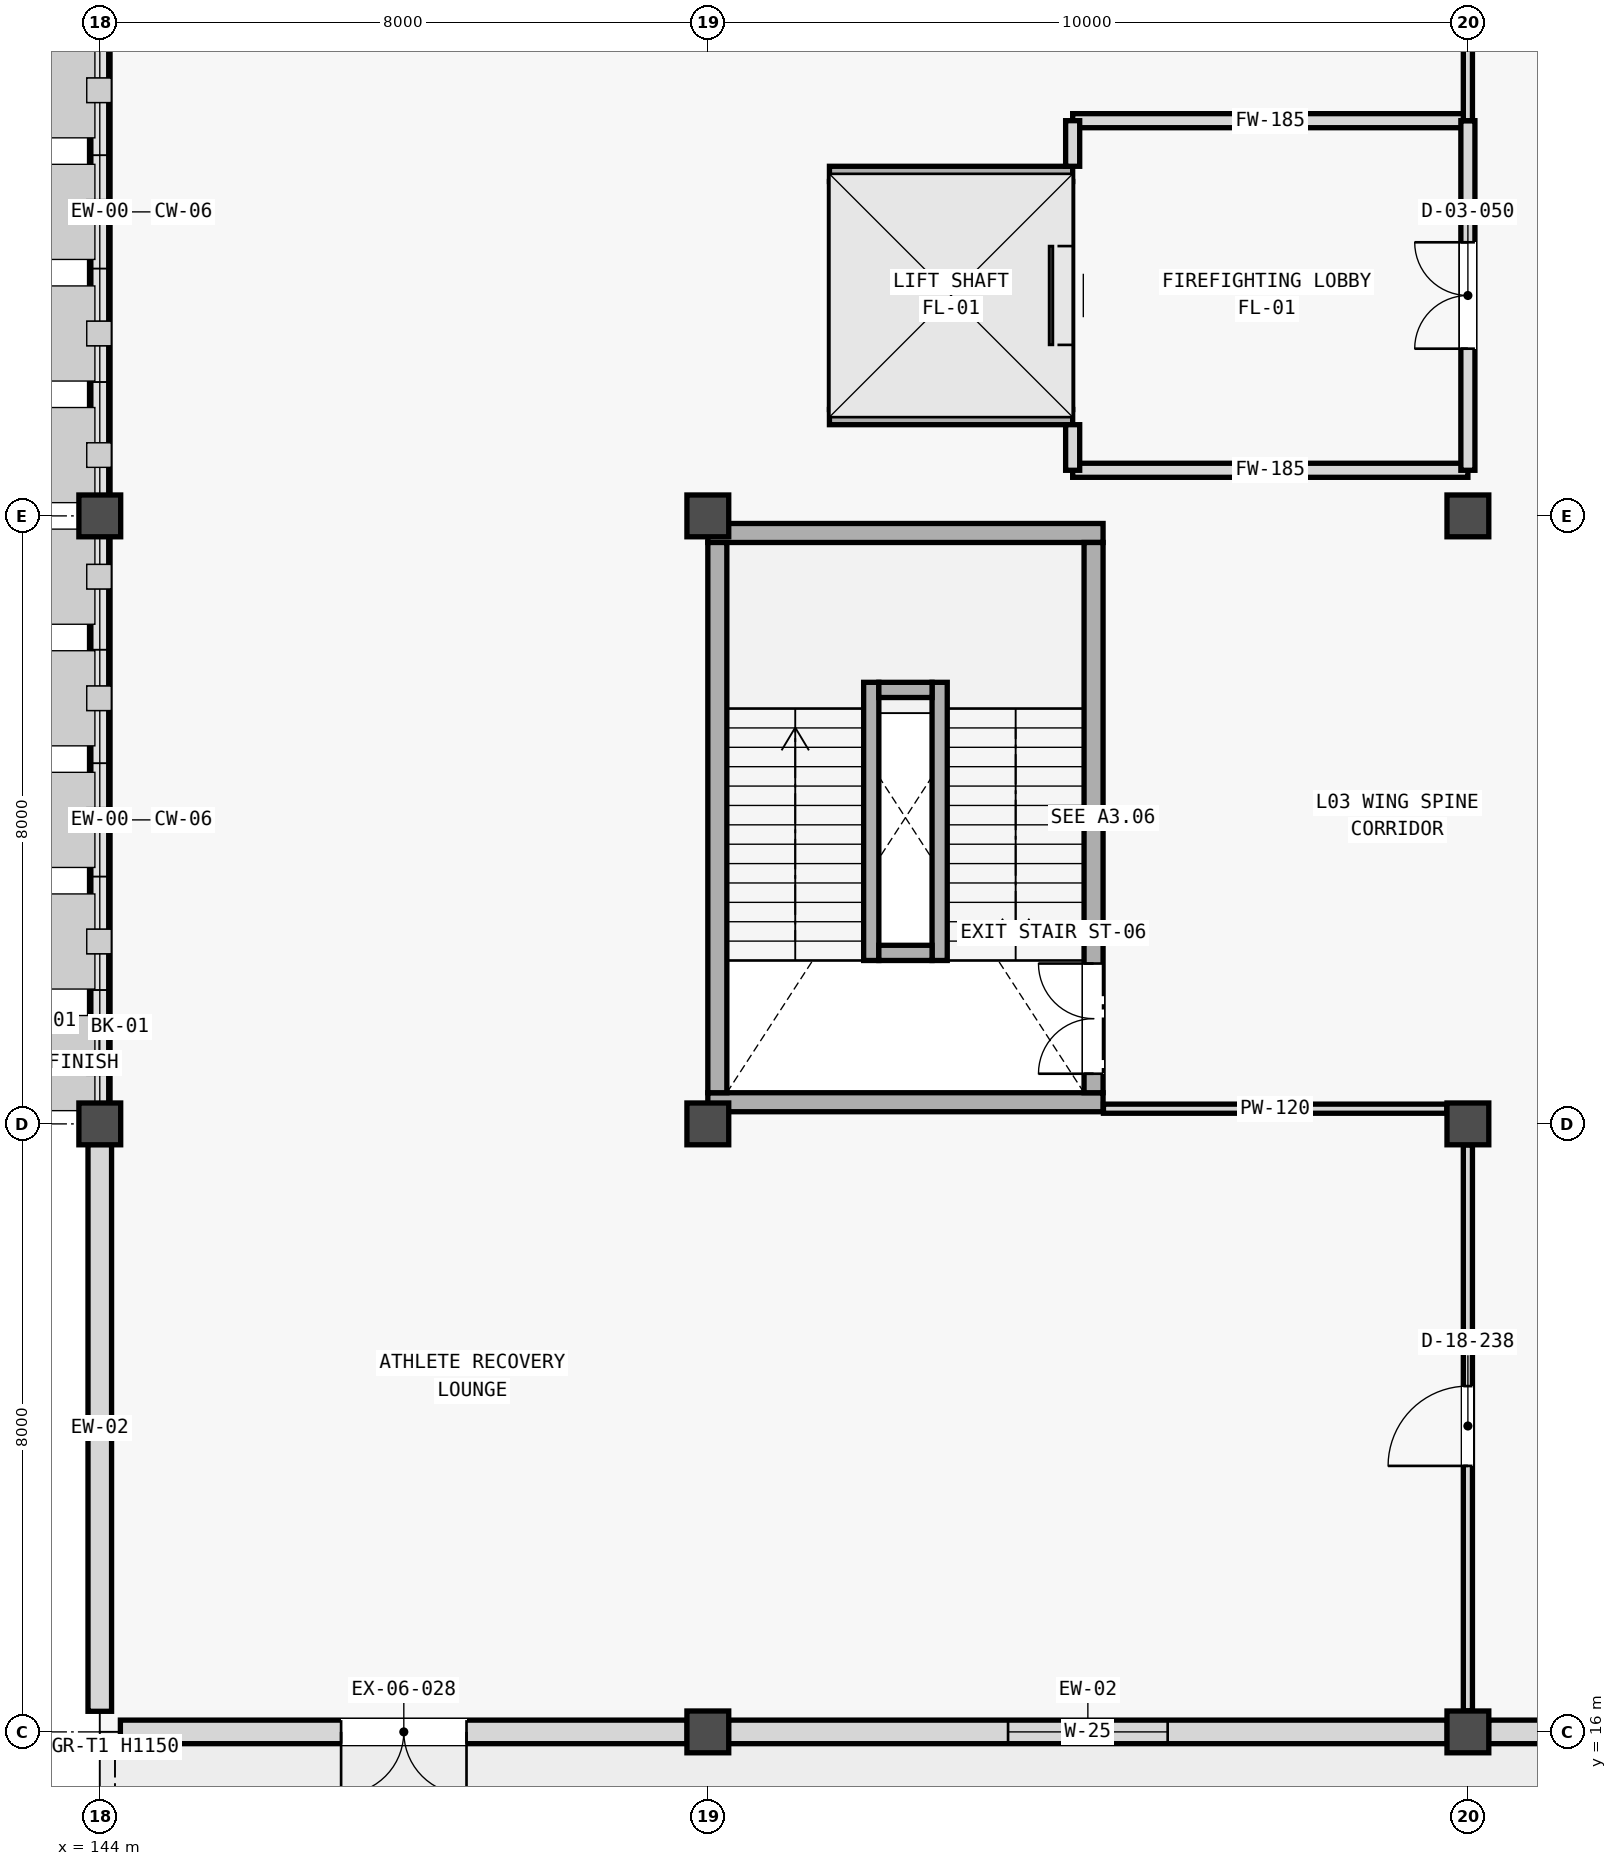
"""IFC4 building model, lengths in metres.
Left out: names, types, materials, properties, quantities, classifications, styles, units other than length and angle.
Written with IfcOpenShell. Run it as: python <this file> out.ifc"""

import sys

from ifc_helpers import new_model, si_unit, direction, frame, frame_2d, origin, origin_2d, place, context, subcontext, project, spatial, rectangle, extrude, element, fill, save


model = new_model("IFC4")
c1 = context("Model", 3, precision=1e-05, world=origin(), true_north=direction((0.0, 1.0)))
c2 = subcontext(c1, "Body", "Model", "MODEL_VIEW")
j1 = project(units=[si_unit("LENGTHUNIT", "METRE"), si_unit("PLANEANGLEUNIT", "RADIAN")], contexts=[c1])
p1 = place(None, origin())
s1 = spatial("IfcSite", under=j1, at=p1, CompositionType="ELEMENT")
p2 = place(p1, origin())
s2 = spatial("IfcBuilding", under=s1, at=p2, CompositionType="ELEMENT")
p3 = place(p2, frame((0.0, 0.0, 14.4)))
s3 = spatial("IfcBuildingStorey", under=s2, at=p3, CompositionType="ELEMENT", Elevation=14.4)
for number, where, z_axis, x_axis in (
    (1, (152.0, 16.0, 0.0), (0.0, 0.0, 1.0), (1.0, 0.0, 0.0)),
    (2, (162.0, 16.0, 0.0), (0.0, 0.0, 1.0), (1.0, 0.0, 0.0)),
):
    element("IfcColumn", number, at=place(p3, frame(where, z_axis=z_axis, x_axis=x_axis)), inside=s3, PredefinedType="COLUMN", context=c2, shape_type="SweptSolid", body=[
        extrude(rectangle(XDim=0.55, YDim=0.55, at=origin_2d()), origin(), (0.0, 0.0, 1.0), 3.985),
    ])
for number, where, z_axis, x_axis in (
    (3, (152.0, 24.0, 0.0), (0.0, 0.0, 1.0), (1.0, 0.0, 0.0)),
    (4, (162.0, 24.0, 0.0), (0.0, 0.0, 1.0), (1.0, 0.0, 0.0)),
):
    element("IfcColumn", number, at=place(p3, frame(where, z_axis=z_axis, x_axis=x_axis)), inside=s3, PredefinedType="COLUMN", context=c2, shape_type="SweptSolid", body=[
        extrude(rectangle(XDim=0.55, YDim=0.55, at=origin_2d()), origin(), (0.0, 0.0, 1.0), 3.975),
    ])
p4 = place(p3, frame((144.0, 32.0, 0.0), z_axis=(0.0, 0.0, 1.0), x_axis=(1.0, 0.0, 0.0)))
e5 = element("IfcColumn", 5, at=p4, inside=s3, PredefinedType="COLUMN", context=c2, shape_type="SweptSolid", body=[
    extrude(rectangle(XDim=0.55, YDim=0.55, at=origin_2d()), origin(), (0.0, 0.0, 1.0), 3.99),
])
for number, where, z_axis, x_axis in (
    (6, (152.0, 32.0, 0.0), (0.0, 0.0, 1.0), (1.0, 0.0, 0.0)),
    (7, (162.0, 32.0, 0.0), (0.0, 0.0, 1.0), (1.0, 0.0, 0.0)),
):
    element("IfcColumn", number, at=place(p3, frame(where, z_axis=z_axis, x_axis=x_axis)), inside=s3, PredefinedType="COLUMN", context=c2, shape_type="SweptSolid", body=[
        extrude(rectangle(XDim=0.55, YDim=0.55, at=origin_2d()), origin(), (0.0, 0.0, 1.0), 3.975),
    ])
p5 = place(p3, frame((144.0, 24.0, 0.0), z_axis=(0.0, 0.0, 1.0), x_axis=(1.0, 0.0, 0.0)))
e8 = element("IfcColumn", 8, at=p5, inside=s3, PredefinedType="COLUMN", context=c2, shape_type="SweptSolid", body=[
    extrude(rectangle(XDim=0.55, YDim=0.55, at=origin_2d()), origin(), (0.0, 0.0, 1.0), 3.99),
])
p6 = place(p3, frame((144.0, 16.271, 0.0), z_axis=(0.0, 0.0, 1.0), x_axis=(0.0, 1.0, 0.0)))
e9 = element("IfcWall", 9, at=p6, inside=s3, PredefinedType="STANDARD", context=c2, shape_type="SweptSolid", body=[
    extrude(rectangle(XDim=7.458, YDim=0.31, at=frame_2d((3.729, 0.0))), origin(), (0.0, 0.0, 1.0), 3.3),
])
for number, where, z_axis, x_axis in (
    (10, (144.0, 24.271, 0.0), (0.0, 0.0, 1.0), (0.0, 1.0, 0.0)),
    (11, (144.0, 32.271, 0.0), (0.0, 0.0, 1.0), (0.0, 1.0, 0.0)),
):
    element("IfcWall", number, at=place(p3, frame(where, z_axis=z_axis, x_axis=x_axis)), inside=s3, PredefinedType="STANDARD", context=c2, shape_type="SweptSolid", body=[
        extrude(rectangle(XDim=7.458, YDim=0.27, at=frame_2d((3.729, 0.0))), origin(), (0.0, 0.0, 1.0), 0.8),
    ])
p7 = place(p3, frame((144.271, 16.0, 0.0), z_axis=(0.0, 0.0, 1.0), x_axis=(1.0, 0.0, 0.0)))
e12 = element("IfcWall", 12, at=p7, inside=s3, PredefinedType="STANDARD", context=c2, shape_type="SweptSolid", body=[
    extrude(rectangle(XDim=7.458, YDim=0.31, at=frame_2d((3.729, 0.0))), origin(), (0.0, 0.0, 1.0), 3.25),
])
p8 = place(p7, frame((2.904, 0.0, 0.0)))
e13 = element("IfcOpeningElement", 13, at=p8, cuts=e12, PredefinedType="OPENING", context=c2, shape_type="SweptSolid", body=[
    extrude(rectangle(XDim=1.65, YDim=2.2, at=frame_2d((0.825, 1.1))), frame((0.0, 0.165, 0.0), z_axis=(0.0, -1.0, 0.0), x_axis=(1.0, 0.0, 0.0)), (0.0, 0.0, 1.0), 0.33),
])
p9 = place(p3, frame((152.271, 16.0, 0.0), z_axis=(0.0, 0.0, 1.0), x_axis=(1.0, 0.0, 0.0)))
e14 = element("IfcWall", 14, at=p9, inside=s3, PredefinedType="STANDARD", context=c2, shape_type="SweptSolid", body=[
    extrude(rectangle(XDim=9.458, YDim=0.31, at=frame_2d((4.729, 0.0))), origin(), (0.0, 0.0, 1.0), 3.25),
])
p10 = place(p9, frame((3.679, 0.0, 0.95)))
e15 = element("IfcOpeningElement", 15, at=p10, cuts=e14, PredefinedType="OPENING", context=c2, shape_type="SweptSolid", body=[
    extrude(rectangle(XDim=2.1, YDim=1.5, at=frame_2d((1.05, 0.75))), frame((0.0, 0.165, 0.0), z_axis=(0.0, -1.0, 0.0), x_axis=(1.0, 0.0, 0.0)), (0.0, 0.0, 1.0), 0.33),
])
p11 = place(p3, frame((162.271, 16.0, 0.0), z_axis=(0.0, 0.0, 1.0), x_axis=(1.0, 0.0, 0.0)))
e16 = element("IfcWall", 16, at=p11, inside=s3, PredefinedType="STANDARD", context=c2, shape_type="SweptSolid", body=[
    extrude(rectangle(XDim=11.458, YDim=0.31, at=frame_2d((5.729, 0.0))), origin(), (0.0, 0.0, 1.0), 3.25),
])
p12 = place(p11, frame((5.104, 0.0, 0.95)))
e17 = element("IfcOpeningElement", 17, at=p12, cuts=e16, PredefinedType="OPENING", context=c2, shape_type="SweptSolid", body=[
    extrude(rectangle(XDim=1.25, YDim=1.35, at=frame_2d((0.625, 0.675))), frame((0.0, 0.165, 0.0), z_axis=(0.0, -1.0, 0.0), x_axis=(1.0, 0.0, 0.0)), (0.0, 0.0, 1.0), 0.33),
])
for number, where, z_axis, x_axis in (
    (18, (152.0, 24.285, 0.0), (0.0, 0.0, 1.0), (1.0, 0.0, 0.0)),
    (19, (152.0, 31.775, 0.0), (0.0, 0.0, 1.0), (1.0, 0.0, 0.0)),
):
    element("IfcWall", number, at=place(p3, frame(where, z_axis=z_axis, x_axis=x_axis)), inside=s3, PredefinedType="SHEAR", context=c2, shape_type="SweptSolid", body=[
        extrude(rectangle(XDim=5.2, YDim=0.25, at=frame_2d((2.6, 0.0))), origin(), (0.0, 0.0, 1.0), 4.2),
    ])
p13 = place(p3, frame((152.125, 24.41, 0.0), z_axis=(0.0, 0.0, 1.0), x_axis=(0.0, 1.0, 0.0)))
e20 = element("IfcWall", 20, at=p13, inside=s3, PredefinedType="SHEAR", context=c2, shape_type="SweptSolid", body=[
    extrude(rectangle(XDim=7.24, YDim=0.25, at=frame_2d((3.62, 0.0))), origin(), (0.0, 0.0, 1.0), 4.2),
])
p14 = place(p3, frame((157.075, 24.41, 0.0), z_axis=(0.0, 0.0, 1.0), x_axis=(0.0, 1.0, 0.0)))
e21 = element("IfcWall", 21, at=p14, inside=s3, PredefinedType="SHEAR", context=c2, shape_type="SweptSolid", body=[
    extrude(rectangle(XDim=7.24, YDim=0.25, at=frame_2d((3.62, 0.0))), origin(), (0.0, 0.0, 1.0), 4.2),
])
p15 = place(p14, frame((0.25, 0.0, 0.0)))
e22 = element("IfcOpeningElement", 22, at=p15, cuts=e21, PredefinedType="OPENING", context=c2, shape_type="SweptSolid", body=[
    extrude(rectangle(XDim=1.45, YDim=2.2, at=frame_2d((0.725, 1.1))), frame((0.0, 0.135, 0.0), z_axis=(0.0, -1.0, 0.0), x_axis=(1.0, 0.0, 0.0)), (0.0, 0.0, 1.0), 0.27),
])
for number, where, z_axis, x_axis in (
    (23, (154.15, 26.15, 0.0), (0.0, 0.0, 1.0), (0.0, 1.0, 0.0)),
    (24, (155.05, 26.15, 0.0), (0.0, 0.0, 1.0), (0.0, 1.0, 0.0)),
):
    element("IfcWall", number, at=place(p3, frame(where, z_axis=z_axis, x_axis=x_axis)), inside=s3, PredefinedType="SHEAR", context=c2, shape_type="SweptSolid", body=[
        extrude(rectangle(XDim=3.66, YDim=0.2, at=frame_2d((1.83, 0.0))), origin(), (0.0, 0.0, 1.0), 4.2),
    ])
for number, where, z_axis, x_axis in (
    (25, (154.25, 26.25, 0.0), (0.0, 0.0, 1.0), (1.0, 0.0, 0.0)),
    (26, (154.25, 29.71, 0.0), (0.0, 0.0, 1.0), (1.0, 0.0, 0.0)),
):
    element("IfcWall", number, at=place(p3, frame(where, z_axis=z_axis, x_axis=x_axis)), inside=s3, PredefinedType="SHEAR", context=c2, shape_type="SweptSolid", body=[
        extrude(rectangle(XDim=0.7, YDim=0.2, at=frame_2d((0.35, 0.0))), origin(), (0.0, 0.0, 1.0), 4.2),
    ])
for number, where, z_axis, x_axis in (
    (27, (153.6, 33.3, 0.0), (0.0, 0.0, 1.0), (1.0, 0.0, 0.0)),
    (28, (153.6, 36.5, 0.0), (0.0, 0.0, 1.0), (1.0, 0.0, 0.0)),
):
    element("IfcWall", number, at=place(p3, frame(where, z_axis=z_axis, x_axis=x_axis)), inside=s3, PredefinedType="SHEAR", context=c2, shape_type="SweptSolid", body=[
        extrude(rectangle(XDim=3.2, YDim=0.2, at=frame_2d((1.6, 0.0))), origin(), (0.0, 0.0, 1.0), 4.2),
    ])
p16 = place(p3, frame((153.7, 33.4, 0.0), z_axis=(0.0, 0.0, 1.0), x_axis=(0.0, 1.0, 0.0)))
e29 = element("IfcWall", 29, at=p16, inside=s3, PredefinedType="SHEAR", context=c2, shape_type="SweptSolid", body=[
    extrude(rectangle(XDim=3.0, YDim=0.2, at=frame_2d((1.5, 0.0))), origin(), (0.0, 0.0, 1.0), 4.2),
])
p17 = place(p3, frame((156.7, 33.4, 0.0), z_axis=(0.0, 0.0, 1.0), x_axis=(0.0, 1.0, 0.0)))
e30 = element("IfcWall", 30, at=p17, inside=s3, PredefinedType="SHEAR", context=c2, shape_type="SweptSolid", body=[
    extrude(rectangle(XDim=3.0, YDim=0.2, at=frame_2d((1.5, 0.0))), origin(), (0.0, 0.0, 1.0), 4.2),
])
p18 = place(p17, frame((0.85, 0.0, 0.0)))
e31 = element("IfcOpeningElement", 31, at=p18, cuts=e30, PredefinedType="OPENING", context=c2, shape_type="SweptSolid", body=[
    extrude(rectangle(XDim=1.3, YDim=2.3, at=frame_2d((0.65, 1.15))), frame((0.0, 0.11, 0.0), z_axis=(0.0, -1.0, 0.0), x_axis=(1.0, 0.0, 0.0)), (0.0, 0.0, 1.0), 0.22),
])
for number, where, z_axis, x_axis in (
    (32, (162.0, 32.6, 0.0), (0.0, 0.0, 1.0), (-1.0, 0.0, 0.0)),
    (33, (156.8, 37.2, 0.0), (0.0, 0.0, 1.0), (1.0, 0.0, 0.0)),
):
    element("IfcWall", number, at=place(p3, frame(where, z_axis=z_axis, x_axis=x_axis)), inside=s3, PredefinedType="STANDARD", context=c2, shape_type="SweptSolid", body=[
        extrude(rectangle(XDim=5.2, YDim=0.185, at=frame_2d((2.6, 0.0))), origin(), (0.0, 0.0, 1.0), 3.255),
    ])
p19 = place(p3, frame((162.0, 32.6, 0.0), z_axis=(0.0, 0.0, 1.0), x_axis=(0.0, 1.0, 0.0)))
e34 = element("IfcWall", 34, at=p19, inside=s3, PredefinedType="STANDARD", context=c2, shape_type="SweptSolid", body=[
    extrude(rectangle(XDim=4.6, YDim=0.185, at=frame_2d((2.3, 0.0))), origin(), (0.0, 0.0, 1.0), 3.255),
])
p20 = place(p19, frame((1.6, 0.0, 0.0)))
e35 = element("IfcOpeningElement", 35, at=p20, cuts=e34, PredefinedType="OPENING", context=c2, shape_type="SweptSolid", body=[
    extrude(rectangle(XDim=1.4, YDim=2.2, at=frame_2d((0.7, 1.1))), frame((0.0, 0.103, 0.0), z_axis=(0.0, -1.0, 0.0), x_axis=(1.0, 0.0, 0.0)), (0.0, 0.0, 1.0), 0.205),
])
for number, where, z_axis, x_axis in (
    (36, (156.8, 32.6, 0.0), (0.0, 0.0, 1.0), (0.0, 1.0, 0.0)),
    (37, (156.8, 36.6, 0.0), (0.0, 0.0, 1.0), (0.0, 1.0, 0.0)),
):
    element("IfcWall", number, at=place(p3, frame(where, z_axis=z_axis, x_axis=x_axis)), inside=s3, PredefinedType="STANDARD", context=c2, shape_type="SweptSolid", body=[
        extrude(rectangle(XDim=0.6, YDim=0.185, at=frame_2d((0.3, 0.0))), origin(), (0.0, 0.0, 1.0), 3.255),
    ])
p21 = place(p3, frame((162.0, 16.277, 0.0), z_axis=(0.0, 0.0, 1.0), x_axis=(0.0, 1.0, 0.0)))
e38 = element("IfcWall", 38, at=p21, inside=s3, PredefinedType="PARTITIONING", context=c2, shape_type="SweptSolid", body=[
    extrude(rectangle(XDim=7.446, YDim=0.12, at=frame_2d((3.723, 0.0))), origin(), (0.0, 0.0, 1.0), 3.255),
])
p22 = place(p21, frame((3.223, 0.0, 0.0)))
e39 = element("IfcOpeningElement", 39, at=p22, cuts=e38, PredefinedType="OPENING", context=c2, shape_type="SweptSolid", body=[
    extrude(rectangle(XDim=1.05, YDim=2.2, at=frame_2d((0.525, 1.1))), frame((0.0, 0.07, 0.0), z_axis=(0.0, -1.0, 0.0), x_axis=(1.0, 0.0, 0.0)), (0.0, 0.0, 1.0), 0.14),
])
p23 = place(p3, frame((162.0, 37.2, 0.0), z_axis=(0.0, 0.0, 1.0), x_axis=(0.0, 1.0, 0.0)))
e40 = element("IfcWall", 40, at=p23, inside=s3, PredefinedType="PARTITIONING", context=c2, shape_type="SweptSolid", body=[
    extrude(rectangle(XDim=2.523, YDim=0.12, at=frame_2d((1.261, 0.0))), origin(), (0.0, 0.0, 1.0), 3.255),
])
p24 = place(p3, frame((157.205, 24.2, 0.0), z_axis=(0.0, 0.0, 1.0), x_axis=(1.0, 0.0, 0.0)))
e41 = element("IfcWall", 41, at=p24, inside=s3, PredefinedType="PARTITIONING", context=c2, shape_type="SweptSolid", body=[
    extrude(rectangle(XDim=4.518, YDim=0.12, at=frame_2d((2.259, 0.0))), origin(), (0.0, 0.0, 1.0), 3.255),
])
p25 = place(p8, frame((1.65, 0.0, 0.0), z_axis=(0.0, 0.0, 1.0), x_axis=(-1.0, 0.0, 0.0)))
e42 = element("IfcDoor", 42, at=p25, inside=s3, OperationType="DOUBLE_DOOR_SINGLE_SWING", PredefinedType="DOOR", context=c2, shape_type="SweptSolid", body=[
    extrude(rectangle(XDim=1.65, YDim=2.2, at=frame_2d((0.825, 1.1))), frame((0.0, 0.025, 0.0), z_axis=(0.0, -1.0, 0.0), x_axis=(1.0, 0.0, 0.0)), (0.0, 0.0, 1.0), 0.05),
])
fill(e13, e42)
p26 = place(p10, origin())
e43 = element("IfcWindow", 43, at=p26, inside=s3, PartitioningType="SINGLE_PANEL", PredefinedType="WINDOW", context=c2, shape_type="SweptSolid", body=[
    extrude(rectangle(XDim=2.1, YDim=1.5, at=frame_2d((1.05, 0.75))), frame((0.0, 0.03, 0.0), z_axis=(0.0, -1.0, 0.0), x_axis=(1.0, 0.0, 0.0)), (0.0, 0.0, 1.0), 0.06),
])
fill(e15, e43)
p27 = place(p15, origin())
e44 = element("IfcDoor", 44, at=p27, inside=s3, OperationType="DOUBLE_DOOR_SINGLE_SWING", PredefinedType="DOOR", context=c2, shape_type="SweptSolid", body=[
    extrude(rectangle(XDim=1.45, YDim=2.2, at=frame_2d((0.725, 1.1))), frame((0.0, 0.025, 0.0), z_axis=(0.0, -1.0, 0.0), x_axis=(1.0, 0.0, 0.0)), (0.0, 0.0, 1.0), 0.05),
])
fill(e22, e44)
p28 = place(p18, origin())
e45 = element("IfcDoor", 45, at=p28, inside=s3, OperationType="SLIDING_TO_RIGHT", PredefinedType="DOOR", context=c2, shape_type="SweptSolid", body=[
    extrude(rectangle(XDim=1.3, YDim=2.3, at=frame_2d((0.65, 1.15))), frame((0.0, 0.025, 0.0), z_axis=(0.0, -1.0, 0.0), x_axis=(1.0, 0.0, 0.0)), (0.0, 0.0, 1.0), 0.05),
])
fill(e31, e45)
p29 = place(p20, origin())
e46 = element("IfcDoor", 46, at=p29, inside=s3, OperationType="DOUBLE_DOOR_SINGLE_SWING", PredefinedType="DOOR", context=c2, shape_type="SweptSolid", body=[
    extrude(rectangle(XDim=1.4, YDim=2.2, at=frame_2d((0.7, 1.1))), frame((0.0, 0.025, 0.0), z_axis=(0.0, -1.0, 0.0), x_axis=(1.0, 0.0, 0.0)), (0.0, 0.0, 1.0), 0.05),
])
fill(e35, e46)
p30 = place(p22, origin())
e47 = element("IfcDoor", 47, at=p30, inside=s3, OperationType="SINGLE_SWING_LEFT", PredefinedType="DOOR", context=c2, shape_type="SweptSolid", body=[
    extrude(rectangle(XDim=1.05, YDim=2.2, at=frame_2d((0.525, 1.1))), frame((0.0, 0.025, 0.0), z_axis=(0.0, -1.0, 0.0), x_axis=(1.0, 0.0, 0.0)), (0.0, 0.0, 1.0), 0.05),
])
fill(e39, e47)
save(model, sys.argv[1])
